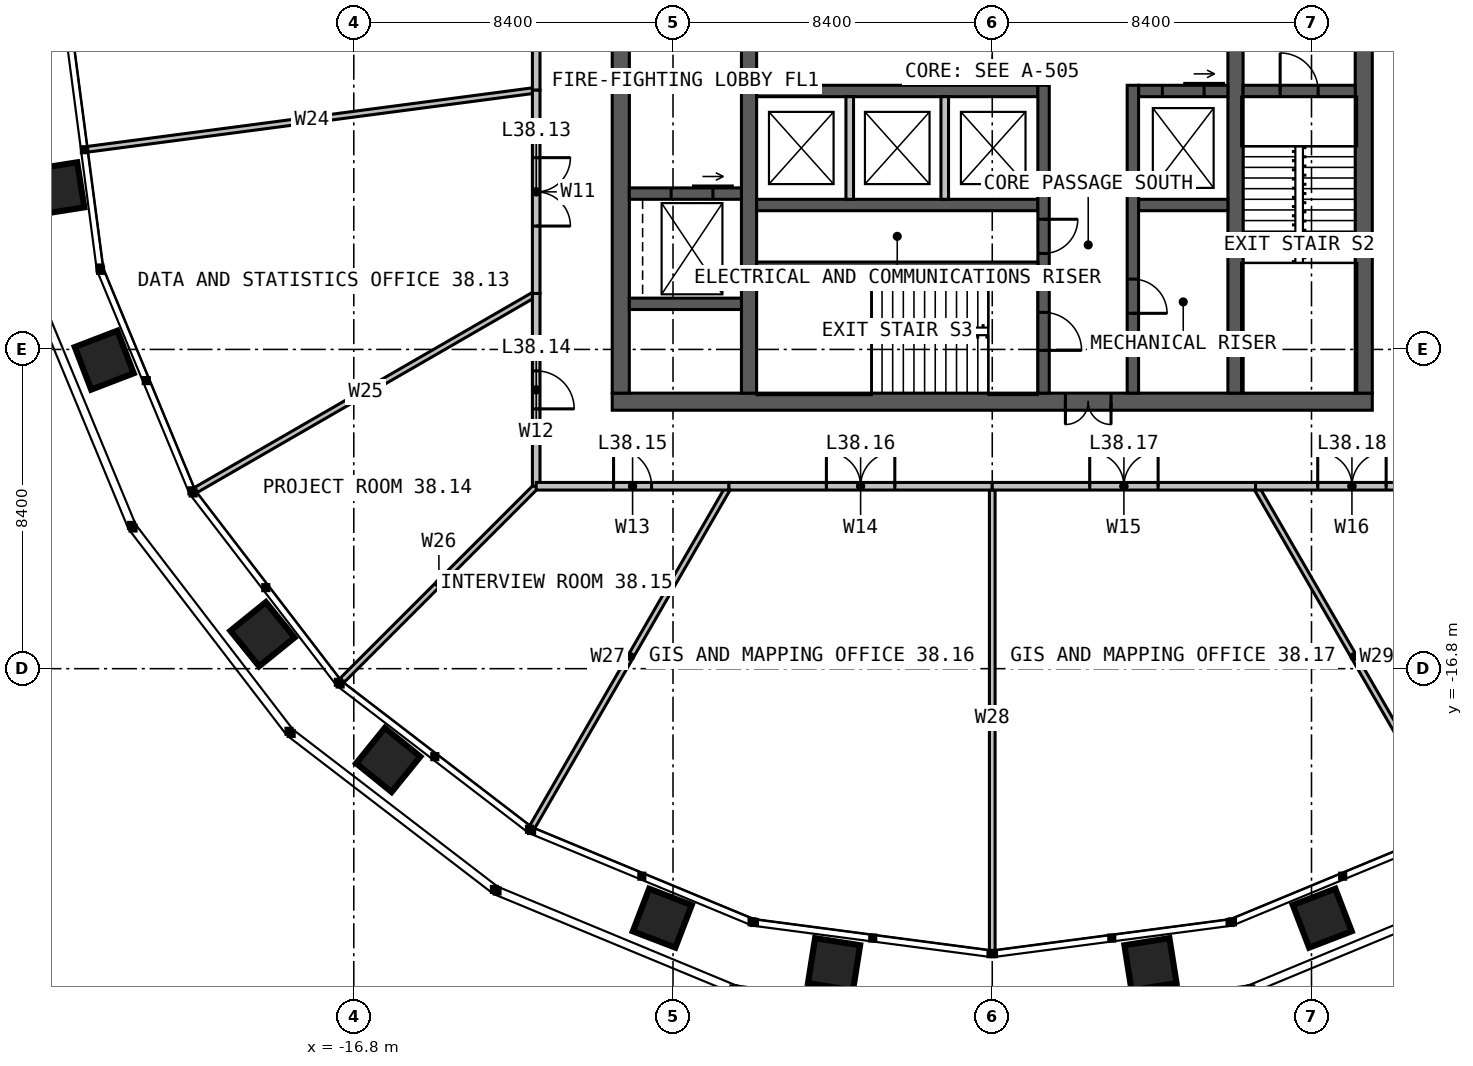
"""IFC4 building model, lengths in metres.
Left out: names, types, materials, properties, quantities, classifications, styles, units other than length and angle.
Written with IfcOpenShell. Run it as: python <this file> out.ifc"""

import sys

from ifc_helpers import new_model, si_unit, direction, frame, frame_2d, origin, place, context, subcontext, project, spatial, rectangle, extrude, element, fill, save


model = new_model("IFC4")
c1 = context("Model", 3, precision=1e-05, world=origin(), true_north=direction((0.0, 1.0)))
c2 = subcontext(c1, "Body", "Model", "MODEL_VIEW")
j1 = project(units=[si_unit("LENGTHUNIT", "METRE"), si_unit("PLANEANGLEUNIT", "RADIAN")], contexts=[c1])
p1 = place(None, origin())
s1 = spatial("IfcSite", under=j1, at=p1, CompositionType="ELEMENT")
p2 = place(p1, origin())
s2 = spatial("IfcBuilding", under=s1, at=p2, CompositionType="ELEMENT")
p3 = place(p2, frame((0.0, 0.0, 159.0)))
s3 = spatial("IfcBuildingStorey", under=s2, at=p3, CompositionType="ELEMENT", Elevation=159.0)
p4 = place(p3, frame((10.0, -9.775, 0.0), z_axis=(0.0, 0.0, 1.0), x_axis=(-1.0, 0.0, 0.0)))
e1 = element("IfcWall", 1, at=p4, inside=s3, PredefinedType="SOLIDWALL", context=c2, shape_type="SweptSolid", body=[
    extrude(rectangle(XDim=20.0, YDim=0.45, at=frame_2d((10.0, 0.0))), origin(), (0.0, 0.0, 1.0), 4.0),
])
p5 = place(p4, frame((6.875, 0.0, 0.0)))
e2 = element("IfcOpeningElement", 2, at=p5, cuts=e1, PredefinedType="OPENING", context=c2, shape_type="SweptSolid", body=[
    extrude(rectangle(XDim=1.2, YDim=2.2, at=frame_2d((0.6, 1.1))), frame((0.0, 0.235, 0.0), z_axis=(0.0, -1.0, 0.0), x_axis=(1.0, 0.0, 0.0)), (0.0, 0.0, 1.0), 0.47),
])
for number, where, z_axis, x_axis in (
    (3, (9.775, -9.55, 0.0), (0.0, 0.0, 1.0), (0.0, 1.0, 0.0)),
    (4, (-9.775, 9.55, 0.0), (0.0, 0.0, 1.0), (0.0, -1.0, 0.0)),
):
    element("IfcWall", number, at=place(p3, frame(where, z_axis=z_axis, x_axis=x_axis)), inside=s3, PredefinedType="SOLIDWALL", context=c2, shape_type="SweptSolid", body=[
        extrude(rectangle(XDim=19.1, YDim=0.45, at=frame_2d((9.55, 0.0))), origin(), (0.0, 0.0, 1.0), 4.0),
    ])
p6 = place(p3, frame((-6.4, -9.55, 0.0), z_axis=(0.0, 0.0, 1.0), x_axis=(0.0, 1.0, 0.0)))
e5 = element("IfcWall", 5, at=p6, inside=s3, PredefinedType="SOLIDWALL", context=c2, shape_type="SweptSolid", body=[
    extrude(rectangle(XDim=19.1, YDim=0.4, at=frame_2d((9.55, 0.0))), origin(), (0.0, 0.0, 1.0), 4.0),
])
p7 = place(p6, frame((9.05, 0.0, 0.0)))
e6 = element("IfcOpeningElement", 6, at=p7, cuts=e5, PredefinedType="OPENING", context=c2, shape_type="SweptSolid", body=[
    extrude(rectangle(XDim=1.0, YDim=2.2, at=frame_2d((0.5, 1.1))), frame((0.0, 0.21, 0.0), z_axis=(0.0, -1.0, 0.0), x_axis=(1.0, 0.0, 0.0)), (0.0, 0.0, 1.0), 0.42),
])
p8 = place(p3, frame((6.4, 9.55, 0.0), z_axis=(0.0, 0.0, 1.0), x_axis=(0.0, -1.0, 0.0)))
e7 = element("IfcWall", 7, at=p8, inside=s3, PredefinedType="SOLIDWALL", context=c2, shape_type="SweptSolid", body=[
    extrude(rectangle(XDim=19.1, YDim=0.4, at=frame_2d((9.55, 0.0))), origin(), (0.0, 0.0, 1.0), 4.0),
])
p9 = place(p8, frame((9.05, 0.0, 0.0)))
e8 = element("IfcOpeningElement", 8, at=p9, cuts=e7, PredefinedType="OPENING", context=c2, shape_type="SweptSolid", body=[
    extrude(rectangle(XDim=1.0, YDim=2.2, at=frame_2d((0.5, 1.1))), frame((0.0, 0.21, 0.0), z_axis=(0.0, -1.0, 0.0), x_axis=(1.0, 0.0, 0.0)), (0.0, 0.0, 1.0), 0.42),
])
p10 = place(p3, frame((-6.2, -1.6, 0.0), z_axis=(0.0, 0.0, 1.0), x_axis=(1.0, 0.0, 0.0)))
e9 = element("IfcWall", 9, at=p10, inside=s3, PredefinedType="SOLIDWALL", context=c2, shape_type="SweptSolid", body=[
    extrude(rectangle(XDim=7.4, YDim=0.3, at=frame_2d((3.7, 0.0))), origin(), (0.0, 0.0, 1.0), 4.0),
])
p11 = place(p3, frame((3.85, -1.6, 0.0), z_axis=(0.0, 0.0, 1.0), x_axis=(1.0, 0.0, 0.0)))
e10 = element("IfcWall", 10, at=p11, inside=s3, PredefinedType="SOLIDWALL", context=c2, shape_type="SweptSolid", body=[
    extrude(rectangle(XDim=2.35, YDim=0.3, at=frame_2d((1.175, 0.0))), origin(), (0.0, 0.0, 1.0), 4.0),
])
p12 = place(p11, frame((0.625, 0.0, 0.0)))
e11 = element("IfcOpeningElement", 11, at=p12, cuts=e10, PredefinedType="OPENING", context=c2, shape_type="SweptSolid", body=[
    extrude(rectangle(XDim=1.1, YDim=2.2, at=frame_2d((0.55, 1.1))), frame((0.0, 0.16, 0.0), z_axis=(0.0, -1.0, 0.0), x_axis=(1.0, 0.0, 0.0)), (0.0, 0.0, 1.0), 0.32),
])
p13 = place(p3, frame((-6.2, -4.6, 0.0), z_axis=(0.0, 0.0, 1.0), x_axis=(1.0, 0.0, 0.0)))
e12 = element("IfcWall", 12, at=p13, inside=s3, PredefinedType="SOLIDWALL", context=c2, shape_type="SweptSolid", body=[
    extrude(rectangle(XDim=7.4, YDim=0.3, at=frame_2d((3.7, 0.0))), origin(), (0.0, 0.0, 1.0), 4.0),
])
p14 = place(p3, frame((3.85, -4.6, 0.0), z_axis=(0.0, 0.0, 1.0), x_axis=(1.0, 0.0, 0.0)))
e13 = element("IfcWall", 13, at=p14, inside=s3, PredefinedType="SOLIDWALL", context=c2, shape_type="SweptSolid", body=[
    extrude(rectangle(XDim=2.35, YDim=0.3, at=frame_2d((1.175, 0.0))), origin(), (0.0, 0.0, 1.0), 4.0),
])
p15 = place(p3, frame((1.35, -1.45, 0.0), z_axis=(0.0, 0.0, 1.0), x_axis=(0.0, -1.0, 0.0)))
e14 = element("IfcWall", 14, at=p15, inside=s3, PredefinedType="SOLIDWALL", context=c2, shape_type="SweptSolid", body=[
    extrude(rectangle(XDim=8.1, YDim=0.3, at=frame_2d((4.05, 0.0))), origin(), (0.0, 0.0, 1.0), 4.0),
])
p16 = place(p15, frame((5.975, 0.0, 0.0)))
e15 = element("IfcOpeningElement", 15, at=p16, cuts=e14, PredefinedType="OPENING", context=c2, shape_type="SweptSolid", body=[
    extrude(rectangle(XDim=1.0, YDim=2.2, at=frame_2d((0.5, 1.1))), frame((0.0, 0.16, 0.0), z_axis=(0.0, -1.0, 0.0), x_axis=(1.0, 0.0, 0.0)), (0.0, 0.0, 1.0), 0.32),
])
p17 = place(p15, frame((3.525, 0.0, 0.0)))
e16 = element("IfcOpeningElement", 16, at=p17, cuts=e14, PredefinedType="OPENING", context=c2, shape_type="SweptSolid", body=[
    extrude(rectangle(XDim=0.9, YDim=2.2, at=frame_2d((0.45, 1.1))), frame((0.0, 0.16, 0.0), z_axis=(0.0, -1.0, 0.0), x_axis=(1.0, 0.0, 0.0)), (0.0, 0.0, 1.0), 0.32),
])
p18 = place(p3, frame((3.7, -1.45, 0.0), z_axis=(0.0, 0.0, 1.0), x_axis=(0.0, -1.0, 0.0)))
e17 = element("IfcWall", 17, at=p18, inside=s3, PredefinedType="SOLIDWALL", context=c2, shape_type="SweptSolid", body=[
    extrude(rectangle(XDim=8.1, YDim=0.3, at=frame_2d((4.05, 0.0))), origin(), (0.0, 0.0, 1.0), 4.0),
])
p19 = place(p18, frame((5.1, 0.0, 0.0)))
e18 = element("IfcOpeningElement", 18, at=p19, cuts=e17, PredefinedType="OPENING", context=c2, shape_type="SweptSolid", body=[
    extrude(rectangle(XDim=0.9, YDim=2.2, at=frame_2d((0.45, 1.1))), frame((0.0, 0.16, 0.0), z_axis=(0.0, -1.0, 0.0), x_axis=(1.0, 0.0, 0.0)), (0.0, 0.0, 1.0), 0.32),
])
p20 = place(p3, frame((-6.2, -6.2, 0.0), z_axis=(0.0, 0.0, 1.0), x_axis=(1.0, 0.0, 0.0)))
e19 = element("IfcWall", 19, at=p20, inside=s3, PredefinedType="SOLIDWALL", context=c2, shape_type="SweptSolid", body=[
    extrude(rectangle(XDim=7.4, YDim=0.2, at=frame_2d((3.7, 0.0))), origin(), (0.0, 0.0, 1.0), 4.0),
])
p21 = place(p3, frame((6.6, -1.6, 0.0), z_axis=(0.0, 0.0, 1.0), x_axis=(1.0, 0.0, 0.0)))
e20 = element("IfcWall", 20, at=p21, inside=s3, PredefinedType="SOLIDWALL", context=c2, shape_type="SweptSolid", body=[
    extrude(rectangle(XDim=2.95, YDim=0.3, at=frame_2d((1.475, 0.0))), origin(), (0.0, 0.0, 1.0), 4.0),
])
p22 = place(p21, frame((0.975, 0.0, 0.0)))
e21 = element("IfcOpeningElement", 21, at=p22, cuts=e20, PredefinedType="OPENING", context=c2, shape_type="SweptSolid", body=[
    extrude(rectangle(XDim=1.0, YDim=2.2, at=frame_2d((0.5, 1.1))), frame((0.0, 0.16, 0.0), z_axis=(0.0, -1.0, 0.0), x_axis=(1.0, 0.0, 0.0)), (0.0, 0.0, 1.0), 0.32),
])
p23 = place(p3, frame((-9.55, -4.3, 0.0), z_axis=(0.0, 0.0, 1.0), x_axis=(1.0, 0.0, 0.0)))
e22 = element("IfcWall", 22, at=p23, inside=s3, PredefinedType="SOLIDWALL", context=c2, shape_type="SweptSolid", body=[
    extrude(rectangle(XDim=2.95, YDim=0.3, at=frame_2d((1.475, 0.0))), origin(), (0.0, 0.0, 1.0), 4.0),
])
p24 = place(p23, frame((1.1, 0.0, 0.0)))
e23 = element("IfcOpeningElement", 23, at=p24, cuts=e22, PredefinedType="OPENING", context=c2, shape_type="SweptSolid", body=[
    extrude(rectangle(XDim=1.1, YDim=2.2, at=frame_2d((0.55, 1.1))), frame((0.0, 0.16, 0.0), z_axis=(0.0, -1.0, 0.0), x_axis=(1.0, 0.0, 0.0)), (0.0, 0.0, 1.0), 0.32),
])
p25 = place(p3, frame((-9.55, -7.2, 0.0), z_axis=(0.0, 0.0, 1.0), x_axis=(1.0, 0.0, 0.0)))
e24 = element("IfcWall", 24, at=p25, inside=s3, PredefinedType="SOLIDWALL", context=c2, shape_type="SweptSolid", body=[
    extrude(rectangle(XDim=2.95, YDim=0.3, at=frame_2d((1.475, 0.0))), origin(), (0.0, 0.0, 1.0), 4.0),
])
for number, where, z_axis, x_axis in (
    (25, (-3.75, -1.75, 0.0), (0.0, 0.0, 1.0), (0.0, -1.0, 0.0)),
    (26, (-1.25, -1.75, 0.0), (0.0, 0.0, 1.0), (0.0, -1.0, 0.0)),
):
    element("IfcWall", number, at=place(p3, frame(where, z_axis=z_axis, x_axis=x_axis)), inside=s3, PredefinedType="SOLIDWALL", context=c2, shape_type="SweptSolid", body=[
        extrude(rectangle(XDim=2.7, YDim=0.2, at=frame_2d((1.35, 0.0))), origin(), (0.0, 0.0, 1.0), 3.75),
    ])
p26 = place(p3, frame((-12.0, -1.58, 0.0), z_axis=(0.0, 0.0, 1.0), x_axis=(-0.99144619379, -0.130516071116, 0.0)))
e27 = element("IfcWall", 27, at=p26, inside=s3, PredefinedType="PARTITIONING", context=c2, shape_type="SweptSolid", body=[
    extrude(rectangle(XDim=11.901, YDim=0.15, at=frame_2d((5.95, 0.0))), origin(), (0.0, 0.0, 1.0), 2.79),
])
p27 = place(p3, frame((-12.0, -6.928, 0.0), z_axis=(0.0, 0.0, 1.0), x_axis=(-0.86602185845, -0.500006140648, 0.0)))
e28 = element("IfcWall", 28, at=p27, inside=s3, PredefinedType="PARTITIONING", context=c2, shape_type="SweptSolid", body=[
    extrude(rectangle(XDim=10.355, YDim=0.15, at=frame_2d((5.177, 0.0))), origin(), (0.0, 0.0, 1.0), 2.79),
])
p28 = place(p3, frame((-12.0, -12.0, 0.0), z_axis=(0.0, 0.0, 1.0), x_axis=(-0.707106781187, -0.707106781187, 0.0)))
e29 = element("IfcWall", 29, at=p28, inside=s3, PredefinedType="PARTITIONING", context=c2, shape_type="SweptSolid", body=[
    extrude(rectangle(XDim=7.24, YDim=0.15, at=frame_2d((3.62, 0.0))), origin(), (0.0, 0.0, 1.0), 2.79),
])
p29 = place(p3, frame((-6.928, -12.0, 0.0), z_axis=(0.0, 0.0, 1.0), x_axis=(-0.500006140648, -0.86602185845, 0.0)))
e30 = element("IfcWall", 30, at=p29, inside=s3, PredefinedType="PARTITIONING", context=c2, shape_type="SweptSolid", body=[
    extrude(rectangle(XDim=10.355, YDim=0.15, at=frame_2d((5.177, 0.0))), origin(), (0.0, 0.0, 1.0), 2.79),
])
p30 = place(p3, frame((0.0, -12.0, 0.0), z_axis=(0.0, 0.0, 1.0), x_axis=(0.0, -1.0, 0.0)))
e31 = element("IfcWall", 31, at=p30, inside=s3, PredefinedType="PARTITIONING", context=c2, shape_type="SweptSolid", body=[
    extrude(rectangle(XDim=12.211, YDim=0.15, at=frame_2d((6.105, 0.0))), origin(), (0.0, 0.0, 1.0), 2.79),
])
p31 = place(p3, frame((6.928, -12.0, 0.0), z_axis=(0.0, 0.0, 1.0), x_axis=(0.500006140648, -0.86602185845, 0.0)))
e32 = element("IfcWall", 32, at=p31, inside=s3, PredefinedType="PARTITIONING", context=c2, shape_type="SweptSolid", body=[
    extrude(rectangle(XDim=10.355, YDim=0.15, at=frame_2d((5.177, 0.0))), origin(), (0.0, 0.0, 1.0), 2.79),
])
p32 = place(p3, frame((-12.0, 6.928, 0.0), z_axis=(0.0, 0.0, 1.0), x_axis=(0.0, -1.0, 0.0)))
e33 = element("IfcWall", 33, at=p32, inside=s3, PredefinedType="PARTITIONING", context=c2, shape_type="SweptSolid", body=[
    extrude(rectangle(XDim=8.508, YDim=0.2, at=frame_2d((4.254, 0.0))), origin(), (0.0, 0.0, 1.0), 3.8),
])
p33 = place(p32, frame((3.354, 0.0, 0.0)))
e34 = element("IfcOpeningElement", 34, at=p33, cuts=e33, PredefinedType="OPENING", context=c2, shape_type="SweptSolid", body=[
    extrude(rectangle(XDim=1.8, YDim=2.2, at=frame_2d((0.9, 1.1))), frame((0.0, 0.11, 0.0), z_axis=(0.0, -1.0, 0.0), x_axis=(1.0, 0.0, 0.0)), (0.0, 0.0, 1.0), 0.22),
])
p34 = place(p3, frame((-12.0, -1.58, 0.0), z_axis=(0.0, 0.0, 1.0), x_axis=(0.0, -1.0, 0.0)))
e35 = element("IfcWall", 35, at=p34, inside=s3, PredefinedType="PARTITIONING", context=c2, shape_type="SweptSolid", body=[
    extrude(rectangle(XDim=5.348, YDim=0.2, at=frame_2d((2.674, 0.0))), origin(), (0.0, 0.0, 1.0), 3.8),
])
p35 = place(p34, frame((1.774, 0.0, 0.0)))
e36 = element("IfcOpeningElement", 36, at=p35, cuts=e35, PredefinedType="OPENING", context=c2, shape_type="SweptSolid", body=[
    extrude(rectangle(XDim=1.8, YDim=2.2, at=frame_2d((0.9, 1.1))), frame((0.0, 0.11, 0.0), z_axis=(0.0, -1.0, 0.0), x_axis=(1.0, 0.0, 0.0)), (0.0, 0.0, 1.0), 0.22),
])
p36 = place(p3, frame((-12.0, -6.928, 0.0), z_axis=(0.0, 0.0, 1.0), x_axis=(0.0, -1.0, 0.0)))
e37 = element("IfcWall", 37, at=p36, inside=s3, PredefinedType="PARTITIONING", context=c2, shape_type="SweptSolid", body=[
    extrude(rectangle(XDim=5.072, YDim=0.2, at=frame_2d((2.536, 0.0))), origin(), (0.0, 0.0, 1.0), 3.8),
])
p37 = place(p36, frame((2.036, 0.0, 0.0)))
e38 = element("IfcOpeningElement", 38, at=p37, cuts=e37, PredefinedType="OPENING", context=c2, shape_type="SweptSolid", body=[
    extrude(rectangle(XDim=1.0, YDim=2.2, at=frame_2d((0.5, 1.1))), frame((0.0, 0.11, 0.0), z_axis=(0.0, -1.0, 0.0), x_axis=(1.0, 0.0, 0.0)), (0.0, 0.0, 1.0), 0.22),
])
p38 = place(p3, frame((-12.0, -12.0, 0.0), z_axis=(0.0, 0.0, 1.0), x_axis=(1.0, 0.0, 0.0)))
e39 = element("IfcWall", 39, at=p38, inside=s3, PredefinedType="PARTITIONING", context=c2, shape_type="SweptSolid", body=[
    extrude(rectangle(XDim=5.072, YDim=0.2, at=frame_2d((2.536, 0.0))), origin(), (0.0, 0.0, 1.0), 3.8),
])
p39 = place(p38, frame((2.036, 0.0, 0.0)))
e40 = element("IfcOpeningElement", 40, at=p39, cuts=e39, PredefinedType="OPENING", context=c2, shape_type="SweptSolid", body=[
    extrude(rectangle(XDim=1.0, YDim=2.2, at=frame_2d((0.5, 1.1))), frame((0.0, 0.11, 0.0), z_axis=(0.0, -1.0, 0.0), x_axis=(1.0, 0.0, 0.0)), (0.0, 0.0, 1.0), 0.22),
])
p40 = place(p3, frame((-6.928, -12.0, 0.0), z_axis=(0.0, 0.0, 1.0), x_axis=(1.0, 0.0, 0.0)))
e41 = element("IfcWall", 41, at=p40, inside=s3, PredefinedType="PARTITIONING", context=c2, shape_type="SweptSolid", body=[
    extrude(rectangle(XDim=6.928, YDim=0.2, at=frame_2d((3.464, 0.0))), origin(), (0.0, 0.0, 1.0), 3.8),
])
p41 = place(p40, frame((2.564, 0.0, 0.0)))
e42 = element("IfcOpeningElement", 42, at=p41, cuts=e41, PredefinedType="OPENING", context=c2, shape_type="SweptSolid", body=[
    extrude(rectangle(XDim=1.8, YDim=2.2, at=frame_2d((0.9, 1.1))), frame((0.0, 0.11, 0.0), z_axis=(0.0, -1.0, 0.0), x_axis=(1.0, 0.0, 0.0)), (0.0, 0.0, 1.0), 0.22),
])
p42 = place(p3, frame((0.0, -12.0, 0.0), z_axis=(0.0, 0.0, 1.0), x_axis=(1.0, 0.0, 0.0)))
e43 = element("IfcWall", 43, at=p42, inside=s3, PredefinedType="PARTITIONING", context=c2, shape_type="SweptSolid", body=[
    extrude(rectangle(XDim=6.928, YDim=0.2, at=frame_2d((3.464, 0.0))), origin(), (0.0, 0.0, 1.0), 3.8),
])
p43 = place(p42, frame((2.564, 0.0, 0.0)))
e44 = element("IfcOpeningElement", 44, at=p43, cuts=e43, PredefinedType="OPENING", context=c2, shape_type="SweptSolid", body=[
    extrude(rectangle(XDim=1.8, YDim=2.2, at=frame_2d((0.9, 1.1))), frame((0.0, 0.11, 0.0), z_axis=(0.0, -1.0, 0.0), x_axis=(1.0, 0.0, 0.0)), (0.0, 0.0, 1.0), 0.22),
])
p44 = place(p3, frame((6.928, -12.0, 0.0), z_axis=(0.0, 0.0, 1.0), x_axis=(1.0, 0.0, 0.0)))
e45 = element("IfcWall", 45, at=p44, inside=s3, PredefinedType="PARTITIONING", context=c2, shape_type="SweptSolid", body=[
    extrude(rectangle(XDim=5.072, YDim=0.2, at=frame_2d((2.536, 0.0))), origin(), (0.0, 0.0, 1.0), 3.8),
])
p45 = place(p44, frame((1.636, 0.0, 0.0)))
e46 = element("IfcOpeningElement", 46, at=p45, cuts=e45, PredefinedType="OPENING", context=c2, shape_type="SweptSolid", body=[
    extrude(rectangle(XDim=1.8, YDim=2.2, at=frame_2d((0.9, 1.1))), frame((0.0, 0.11, 0.0), z_axis=(0.0, -1.0, 0.0), x_axis=(1.0, 0.0, 0.0)), (0.0, 0.0, 1.0), 0.22),
])
p46 = place(p5, origin())
e47 = element("IfcDoor", 47, at=p46, inside=s3, OperationType="DOUBLE_DOOR_SINGLE_SWING", PredefinedType="DOOR", context=c2, shape_type="SweptSolid", body=[
    extrude(rectangle(XDim=1.2, YDim=2.2, at=frame_2d((0.6, 1.1))), frame((0.0, 0.025, 0.0), z_axis=(0.0, -1.0, 0.0), x_axis=(1.0, 0.0, 0.0)), (0.0, 0.0, 1.0), 0.05),
])
fill(e2, e47)
p47 = place(p22, origin())
e48 = element("IfcDoor", 48, at=p47, inside=s3, OperationType="SINGLE_SWING_LEFT", PredefinedType="DOOR", context=c2, shape_type="SweptSolid", body=[
    extrude(rectangle(XDim=1.0, YDim=2.2, at=frame_2d((0.5, 1.1))), frame((0.0, 0.025, 0.0), z_axis=(0.0, -1.0, 0.0), x_axis=(1.0, 0.0, 0.0)), (0.0, 0.0, 1.0), 0.05),
])
fill(e21, e48)
p48 = place(p16, origin())
e49 = element("IfcDoor", 49, at=p48, inside=s3, OperationType="SINGLE_SWING_RIGHT", PredefinedType="DOOR", context=c2, shape_type="SweptSolid", body=[
    extrude(rectangle(XDim=1.0, YDim=2.2, at=frame_2d((0.5, 1.1))), frame((0.0, 0.025, 0.0), z_axis=(0.0, -1.0, 0.0), x_axis=(1.0, 0.0, 0.0)), (0.0, 0.0, 1.0), 0.05),
])
fill(e15, e49)
p49 = place(p17, origin())
e50 = element("IfcDoor", 50, at=p49, inside=s3, OperationType="SINGLE_SWING_LEFT", PredefinedType="DOOR", context=c2, shape_type="SweptSolid", body=[
    extrude(rectangle(XDim=0.9, YDim=2.2, at=frame_2d((0.45, 1.1))), frame((0.0, 0.025, 0.0), z_axis=(0.0, -1.0, 0.0), x_axis=(1.0, 0.0, 0.0)), (0.0, 0.0, 1.0), 0.05),
])
fill(e16, e50)
p50 = place(p19, origin())
e51 = element("IfcDoor", 51, at=p50, inside=s3, OperationType="SINGLE_SWING_RIGHT", PredefinedType="DOOR", context=c2, shape_type="SweptSolid", body=[
    extrude(rectangle(XDim=0.9, YDim=2.2, at=frame_2d((0.45, 1.1))), frame((0.0, 0.025, 0.0), z_axis=(0.0, -1.0, 0.0), x_axis=(1.0, 0.0, 0.0)), (0.0, 0.0, 1.0), 0.05),
])
fill(e18, e51)
p51 = place(p12, origin())
e52 = element("IfcDoor", 52, at=p51, inside=s3, OperationType="SLIDING_TO_LEFT", PredefinedType="DOOR", context=c2, shape_type="SweptSolid", body=[
    extrude(rectangle(XDim=1.1, YDim=2.2, at=frame_2d((0.55, 1.1))), frame((0.0, 0.025, 0.0), z_axis=(0.0, -1.0, 0.0), x_axis=(1.0, 0.0, 0.0)), (0.0, 0.0, 1.0), 0.05),
])
fill(e11, e52)
p52 = place(p24, origin())
e53 = element("IfcDoor", 53, at=p52, inside=s3, OperationType="SLIDING_TO_LEFT", PredefinedType="DOOR", context=c2, shape_type="SweptSolid", body=[
    extrude(rectangle(XDim=1.1, YDim=2.2, at=frame_2d((0.55, 1.1))), frame((0.0, 0.025, 0.0), z_axis=(0.0, -1.0, 0.0), x_axis=(1.0, 0.0, 0.0)), (0.0, 0.0, 1.0), 0.05),
])
fill(e23, e53)
p53 = place(p35, origin())
e54 = element("IfcDoor", 54, at=p53, inside=s3, OperationType="DOUBLE_DOOR_SINGLE_SWING", PredefinedType="DOOR", context=c2, shape_type="SweptSolid", body=[
    extrude(rectangle(XDim=1.8, YDim=2.2, at=frame_2d((0.9, 1.1))), frame((0.0, 0.025, 0.0), z_axis=(0.0, -1.0, 0.0), x_axis=(1.0, 0.0, 0.0)), (0.0, 0.0, 1.0), 0.05),
])
fill(e36, e54)
p54 = place(p37, origin())
e55 = element("IfcDoor", 55, at=p54, inside=s3, OperationType="SINGLE_SWING_RIGHT", PredefinedType="DOOR", context=c2, shape_type="SweptSolid", body=[
    extrude(rectangle(XDim=1.0, YDim=2.2, at=frame_2d((0.5, 1.1))), frame((0.0, 0.025, 0.0), z_axis=(0.0, -1.0, 0.0), x_axis=(1.0, 0.0, 0.0)), (0.0, 0.0, 1.0), 0.05),
])
fill(e38, e55)
p55 = place(p39, origin())
e56 = element("IfcDoor", 56, at=p55, inside=s3, OperationType="SINGLE_SWING_LEFT", PredefinedType="DOOR", context=c2, shape_type="SweptSolid", body=[
    extrude(rectangle(XDim=1.0, YDim=2.2, at=frame_2d((0.5, 1.1))), frame((0.0, 0.025, 0.0), z_axis=(0.0, -1.0, 0.0), x_axis=(1.0, 0.0, 0.0)), (0.0, 0.0, 1.0), 0.05),
])
fill(e40, e56)
p56 = place(p41, origin())
e57 = element("IfcDoor", 57, at=p56, inside=s3, OperationType="DOUBLE_DOOR_SINGLE_SWING", PredefinedType="DOOR", context=c2, shape_type="SweptSolid", body=[
    extrude(rectangle(XDim=1.8, YDim=2.2, at=frame_2d((0.9, 1.1))), frame((0.0, 0.025, 0.0), z_axis=(0.0, -1.0, 0.0), x_axis=(1.0, 0.0, 0.0)), (0.0, 0.0, 1.0), 0.05),
])
fill(e42, e57)
p57 = place(p43, origin())
e58 = element("IfcDoor", 58, at=p57, inside=s3, OperationType="DOUBLE_DOOR_SINGLE_SWING", PredefinedType="DOOR", context=c2, shape_type="SweptSolid", body=[
    extrude(rectangle(XDim=1.8, YDim=2.2, at=frame_2d((0.9, 1.1))), frame((0.0, 0.025, 0.0), z_axis=(0.0, -1.0, 0.0), x_axis=(1.0, 0.0, 0.0)), (0.0, 0.0, 1.0), 0.05),
])
fill(e44, e58)
p58 = place(p45, origin())
e59 = element("IfcDoor", 59, at=p58, inside=s3, OperationType="DOUBLE_DOOR_SINGLE_SWING", PredefinedType="DOOR", context=c2, shape_type="SweptSolid", body=[
    extrude(rectangle(XDim=1.8, YDim=2.2, at=frame_2d((0.9, 1.1))), frame((0.0, 0.025, 0.0), z_axis=(0.0, -1.0, 0.0), x_axis=(1.0, 0.0, 0.0)), (0.0, 0.0, 1.0), 0.05),
])
fill(e46, e59)
save(model, sys.argv[1])
